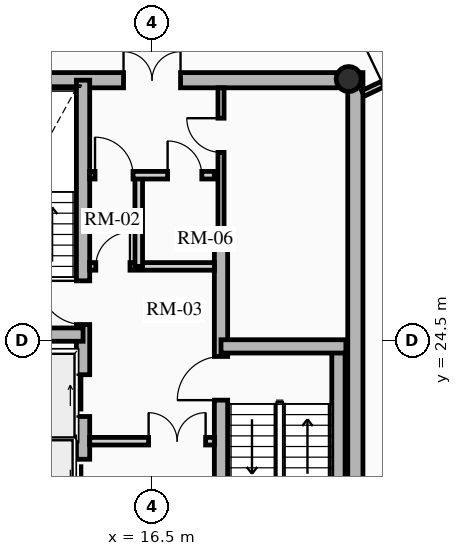
"""IFC4 building model, lengths in metres.
Left out: names, types, materials, properties, quantities, classifications, styles, units other than length and angle.
Written with IfcOpenShell. Run it as: python <this file> out.ifc"""

import sys

from ifc_helpers import new_model, si_unit, direction, frame, frame_2d, origin, origin_2d, place, context, subcontext, project, spatial, rectangle, hollow_circle, extrude, source, transform, mapped, element, fill, save


model = new_model("IFC4")
c1 = context("Model", 3, precision=1e-05, world=origin(), true_north=direction((0.0, 1.0)))
c2 = subcontext(c1, "Body", "Model", "MODEL_VIEW")
j1 = project(units=[si_unit("LENGTHUNIT", "METRE"), si_unit("PLANEANGLEUNIT", "RADIAN")], contexts=[c1])
p1 = place(None, origin())
s1 = spatial("IfcSite", under=j1, at=p1, CompositionType="ELEMENT")
p2 = place(p1, origin())
s2 = spatial("IfcBuilding", under=s1, at=p2, CompositionType="ELEMENT")
p3 = place(p2, frame((0.0, 0.0, 217.03)))
s3 = spatial("IfcBuildingStorey", under=s2, at=p3, CompositionType="ELEMENT", Elevation=217.03)
p4 = place(p3, frame((21.85, 17.45, 0.0), z_axis=(0.0, 0.0, 1.0), x_axis=(0.0, 1.0, 0.0)))
e1 = element("IfcWall", 1, at=p4, inside=s3, PredefinedType="SHEAR", context=c2, shape_type="SweptSolid", body=[
    extrude(rectangle(XDim=14.1, YDim=0.4, at=frame_2d((7.05, 0.0))), origin(), (0.0, 0.0, 1.0), 2.91),
])
p5 = place(p3, frame((11.15, 31.35, 0.0), z_axis=(0.0, 0.0, 1.0), x_axis=(1.0, 0.0, 0.0)))
e2 = element("IfcWall", 2, at=p5, inside=s3, PredefinedType="SHEAR", context=c2, shape_type="SweptSolid", body=[
    extrude(rectangle(XDim=10.7, YDim=0.4, at=frame_2d((5.35, 0.0))), origin(), (0.0, 0.0, 1.0), 2.91),
])
m1 = source(origin(), c2, "Body", "SweptSolid", [
    extrude(rectangle(XDim=1.5, YDim=2.02, at=frame_2d((0.75, 1.01))), frame((0.0, 0.21, 0.0), z_axis=(0.0, -1.0, 0.0), x_axis=(1.0, 0.0, 0.0)), (0.0, 0.0, 1.0), 0.42),
])
p6 = place(p5, frame((4.6, 0.0, 0.0)))
e3 = element("IfcOpeningElement", 3, at=p6, cuts=e2, PredefinedType="OPENING", context=c2, shape_type="MappedRepresentation", body=[
    mapped(m1, transform((0.0, 0.0, 0.0), x_axis=(1.0, 0.0, 0.0), y_axis=(0.0, 1.0, 0.0), z_axis=(0.0, 0.0, 1.0), scale=1.0)),
])
p7 = place(p3, frame((14.685, 17.65, 0.0), z_axis=(0.0, 0.0, 1.0), x_axis=(0.0, 1.0, 0.0)))
e4 = element("IfcWall", 4, at=p7, inside=s3, PredefinedType="SHEAR", context=c2, shape_type="SweptSolid", body=[
    extrude(rectangle(XDim=13.7, YDim=0.35, at=frame_2d((6.85, 0.0))), origin(), (0.0, 0.0, 1.0), 2.91),
])
m2 = source(origin(), c2, "Body", "SweptSolid", [
    extrude(rectangle(XDim=1.1, YDim=2.015, at=frame_2d((0.55, 1.007))), frame((0.0, 0.185, 0.0), z_axis=(0.0, -1.0, 0.0), x_axis=(1.0, 0.0, 0.0)), (0.0, 0.0, 1.0), 0.37),
])
p8 = place(p7, frame((4.85, 0.0, 0.0)))
e5 = element("IfcOpeningElement", 5, at=p8, cuts=e4, PredefinedType="OPENING", context=c2, shape_type="MappedRepresentation", body=[
    mapped(m2, transform((0.0, 0.0, 0.0), x_axis=(1.0, 0.0, 0.0), y_axis=(0.0, 1.0, 0.0), z_axis=(0.0, 0.0, 1.0), scale=1.0)),
])
p9 = place(p7, frame((0.625, 0.0, 0.0)))
e6 = element("IfcOpeningElement", 6, at=p9, cuts=e4, PredefinedType="OPENING", context=c2, shape_type="MappedRepresentation", body=[
    mapped(m2, transform((0.0, 0.0, 0.0), x_axis=(1.0, 0.0, 0.0), y_axis=(0.0, 1.0, 0.0), z_axis=(0.0, 0.0, 1.0), scale=1.0)),
])
p10 = place(p7, frame((2.625, 0.0, 0.0)))
e7 = element("IfcOpeningElement", 7, at=p10, cuts=e4, PredefinedType="OPENING", context=c2, shape_type="MappedRepresentation", body=[
    mapped(m2, transform((0.0, 0.0, 0.0), x_axis=(1.0, 0.0, 0.0), y_axis=(0.0, 1.0, 0.0), z_axis=(0.0, 0.0, 1.0), scale=1.0)),
])
m3 = source(origin(), c2, "Body", "SweptSolid", [
    extrude(rectangle(XDim=1.15, YDim=2.02, at=frame_2d((0.575, 1.01))), frame((0.0, 0.185, 0.0), z_axis=(0.0, -1.0, 0.0), x_axis=(1.0, 0.0, 0.0)), (0.0, 0.0, 1.0), 0.37),
])
p11 = place(p7, frame((7.27, 0.0, 0.0)))
e8 = element("IfcOpeningElement", 8, at=p11, cuts=e4, PredefinedType="OPENING", context=c2, shape_type="MappedRepresentation", body=[
    mapped(m3, transform((0.0, 0.0, 0.0), x_axis=(1.0, 0.0, 0.0), y_axis=(0.0, 1.0, 0.0), z_axis=(0.0, 0.0, 1.0), scale=1.0)),
])
p12 = place(p3, frame((18.315, 17.65, 0.0), z_axis=(0.0, 0.0, 1.0), x_axis=(0.0, 1.0, 0.0)))
e9 = element("IfcWall", 9, at=p12, inside=s3, PredefinedType="SHEAR", context=c2, shape_type="SweptSolid", body=[
    extrude(rectangle(XDim=9.6, YDim=0.35, at=frame_2d((4.8, 0.0))), origin(), (0.0, 0.0, 1.0), 2.91),
])
p13 = place(p12, frame((5.28, 0.0, 0.0)))
e10 = element("IfcOpeningElement", 10, at=p13, cuts=e9, PredefinedType="OPENING", context=c2, shape_type="MappedRepresentation", body=[
    mapped(m3, transform((0.0, 0.0, 0.0), x_axis=(1.0, 0.0, 0.0), y_axis=(0.0, 1.0, 0.0), z_axis=(0.0, 0.0, 1.0), scale=1.0)),
])
p14 = place(p3, frame((11.4, 24.655, 0.0), z_axis=(0.0, 0.0, 1.0), x_axis=(1.0, 0.0, 0.0)))
e11 = element("IfcWall", 11, at=p14, inside=s3, PredefinedType="SHEAR", context=c2, shape_type="SweptSolid", body=[
    extrude(rectangle(XDim=3.285, YDim=0.35, at=frame_2d((1.643, 0.0))), origin(), (0.0, 0.0, 1.0), 2.91),
])
p15 = place(p3, frame((21.405, 17.65, 0.0), z_axis=(0.0, 0.0, 1.0), x_axis=(0.0, 1.0, 0.0)))
e12 = element("IfcWall", 12, at=p15, inside=s3, PredefinedType="SHEAR", context=c2, shape_type="SweptSolid", body=[
    extrude(rectangle(XDim=6.695, YDim=0.35, at=frame_2d((3.348, 0.0))), origin(), (0.0, 0.0, 1.0), 2.91),
])
p16 = place(p3, frame((18.315, 24.345, 0.0), z_axis=(0.0, 0.0, 1.0), x_axis=(1.0, 0.0, 0.0)))
e13 = element("IfcWall", 13, at=p16, inside=s3, PredefinedType="SHEAR", context=c2, shape_type="SweptSolid", body=[
    extrude(rectangle(XDim=3.285, YDim=0.35, at=frame_2d((1.643, 0.0))), origin(), (0.0, 0.0, 1.0), 2.91),
])
p17 = place(p3, frame((21.675, 31.38, 0.0), z_axis=(0.0, 0.0, 1.0), x_axis=(1.0, 0.0, 0.0)))
e14 = element("IfcColumn", 14, at=p17, inside=s3, PredefinedType="COLUMN", context=c2, shape_type="SweptSolid", body=[
    extrude(hollow_circle(Radius=0.33, WallThickness=0.025, at=origin_2d()), origin(), (0.0, 0.0, 1.0), 2.91),
])
p18 = place(p3, frame((11.52, 21.8, 0.0), z_axis=(0.0, 0.0, 1.0), x_axis=(1.0, 0.0, 0.0)))
e15 = element("IfcWall", 15, at=p18, inside=s3, PredefinedType="SHEAR", context=c2, shape_type="SweptSolid", body=[
    extrude(rectangle(XDim=2.97, YDim=0.2, at=frame_2d((1.485, 0.0))), origin(), (0.0, 0.0, 1.0), 2.91),
])
p19 = place(p3, frame((14.86, 21.85, 0.0), z_axis=(0.0, 0.0, 1.0), x_axis=(1.0, 0.0, 0.0)))
e16 = element("IfcWall", 16, at=p19, inside=s3, PredefinedType="PARTITIONING", context=c2, shape_type="SweptSolid", body=[
    extrude(rectangle(XDim=3.28, YDim=0.2, at=frame_2d((1.64, 0.0))), origin(), (0.0, 0.0, 1.0), 2.685),
])
m4 = source(origin(), c2, "Body", "SweptSolid", [
    extrude(rectangle(XDim=1.5, YDim=2.02, at=frame_2d((0.75, 1.01))), frame((0.0, 0.11, 0.0), z_axis=(0.0, -1.0, 0.0), x_axis=(1.0, 0.0, 0.0)), (0.0, 0.0, 1.0), 0.22),
])
p20 = place(p19, frame((1.55, 0.0, 0.0)))
e17 = element("IfcOpeningElement", 17, at=p20, cuts=e16, PredefinedType="OPENING", context=c2, shape_type="MappedRepresentation", body=[
    mapped(m4, transform((0.0, 0.0, 0.0), x_axis=(1.0, 0.0, 0.0), y_axis=(0.0, 1.0, 0.0), z_axis=(0.0, 0.0, 1.0), scale=1.0)),
])
p21 = place(p3, frame((14.86, 26.45, 0.0), z_axis=(0.0, 0.0, 1.0), x_axis=(1.0, 0.0, 0.0)))
e18 = element("IfcWall", 18, at=p21, inside=s3, PredefinedType="PARTITIONING", context=c2, shape_type="SweptSolid", body=[
    extrude(rectangle(XDim=3.28, YDim=0.2, at=frame_2d((1.64, 0.0))), origin(), (0.0, 0.0, 1.0), 2.685),
])
m5 = source(origin(), c2, "Body", "SweptSolid", [
    extrude(rectangle(XDim=0.9, YDim=2.005, at=frame_2d((0.45, 1.002))), frame((0.0, 0.11, 0.0), z_axis=(0.0, -1.0, 0.0), x_axis=(1.0, 0.0, 0.0)), (0.0, 0.0, 1.0), 0.22),
])
p22 = place(p21, frame((0.16, 0.0, 0.0)))
e19 = element("IfcOpeningElement", 19, at=p22, cuts=e18, PredefinedType="OPENING", context=c2, shape_type="MappedRepresentation", body=[
    mapped(m5, transform((0.0, 0.0, 0.0), x_axis=(1.0, 0.0, 0.0), y_axis=(0.0, 1.0, 0.0), z_axis=(0.0, 0.0, 1.0), scale=1.0)),
])
p23 = place(p3, frame((16.15, 26.45, 0.0), z_axis=(0.0, 0.0, 1.0), x_axis=(0.0, 1.0, 0.0)))
e20 = element("IfcWall", 20, at=p23, inside=s3, PredefinedType="PARTITIONING", context=c2, shape_type="SweptSolid", body=[
    extrude(rectangle(XDim=2.4, YDim=0.2, at=frame_2d((1.2, 0.0))), origin(), (0.0, 0.0, 1.0), 2.685),
])
p24 = place(p3, frame((14.86, 28.85, 0.0), z_axis=(0.0, 0.0, 1.0), x_axis=(1.0, 0.0, 0.0)))
e21 = element("IfcWall", 21, at=p24, inside=s3, PredefinedType="PARTITIONING", context=c2, shape_type="SweptSolid", body=[
    extrude(rectangle(XDim=3.28, YDim=0.2, at=frame_2d((1.64, 0.0))), origin(), (0.0, 0.0, 1.0), 2.685),
])
m6 = source(origin(), c2, "Body", "SweptSolid", [
    extrude(rectangle(XDim=1.0, YDim=2.015, at=frame_2d((0.5, 1.007))), frame((0.0, 0.11, 0.0), z_axis=(0.0, -1.0, 0.0), x_axis=(1.0, 0.0, 0.0)), (0.0, 0.0, 1.0), 0.22),
])
p25 = place(p24, frame((0.14, 0.0, 0.0)))
e22 = element("IfcOpeningElement", 22, at=p25, cuts=e21, PredefinedType="OPENING", context=c2, shape_type="MappedRepresentation", body=[
    mapped(m6, transform((0.0, 0.0, 0.0), x_axis=(1.0, 0.0, 0.0), y_axis=(0.0, 1.0, 0.0), z_axis=(0.0, 0.0, 1.0), scale=1.0)),
])
p26 = place(p24, frame((2.05, 0.0, 0.0)))
e23 = element("IfcOpeningElement", 23, at=p26, cuts=e21, PredefinedType="OPENING", context=c2, shape_type="MappedRepresentation", body=[
    mapped(m5, transform((0.0, 0.0, 0.0), x_axis=(1.0, 0.0, 0.0), y_axis=(0.0, 1.0, 0.0), z_axis=(0.0, 0.0, 1.0), scale=1.0)),
])
p27 = place(p3, frame((18.315, 27.25, 0.0), z_axis=(0.0, 0.0, 1.0), x_axis=(0.0, 1.0, 0.0)))
e24 = element("IfcWall", 24, at=p27, inside=s3, PredefinedType="PARTITIONING", context=c2, shape_type="SweptSolid", body=[
    extrude(rectangle(XDim=3.9, YDim=0.16, at=frame_2d((1.95, 0.0))), origin(), (0.0, 0.0, 1.0), 2.685),
])
m7 = source(origin(), c2, "Body", "SweptSolid", [
    extrude(rectangle(XDim=0.9, YDim=2.005, at=frame_2d((0.45, 1.002))), frame((0.0, 0.09, 0.0), z_axis=(0.0, -1.0, 0.0), x_axis=(1.0, 0.0, 0.0)), (0.0, 0.0, 1.0), 0.18),
])
p28 = place(p27, frame((2.2, 0.0, 0.0)))
e25 = element("IfcOpeningElement", 25, at=p28, cuts=e24, PredefinedType="OPENING", context=c2, shape_type="MappedRepresentation", body=[
    mapped(m7, transform((0.0, 0.0, 0.0), x_axis=(1.0, 0.0, 0.0), y_axis=(0.0, 1.0, 0.0), z_axis=(0.0, 0.0, 1.0), scale=1.0)),
])
p29 = place(p3, frame((22.05, 31.0, 0.0), z_axis=(0.0, 0.0, 1.0), x_axis=(0.903013459407, 0.429612257891, 0.0)))
e26 = element("IfcWall", 26, at=p29, inside=s3, PredefinedType="PARTITIONING", context=c2, shape_type="SweptSolid", body=[
    extrude(rectangle(XDim=1.829, YDim=0.16, at=frame_2d((0.914, 0.0))), origin(), (0.0, 0.0, 1.0), 2.255),
])
m8 = source(origin(), c2, "Body", "SweptSolid", [
    extrude(rectangle(XDim=1.05, YDim=2.015, at=frame_2d((0.525, 1.007))), frame((0.0, 0.09, 0.0), z_axis=(0.0, -1.0, 0.0), x_axis=(1.0, 0.0, 0.0)), (0.0, 0.0, 1.0), 0.18),
])
p30 = place(p29, frame((0.579, 0.0, 0.0)))
e27 = element("IfcOpeningElement", 27, at=p30, cuts=e26, PredefinedType="OPENING", context=c2, shape_type="MappedRepresentation", body=[
    mapped(m8, transform((0.0, 0.0, 0.0), x_axis=(1.0, 0.0, 0.0), y_axis=(0.0, 1.0, 0.0), z_axis=(0.0, 0.0, 1.0), scale=1.0)),
])
m9 = source(origin(), c2, "Body", "SweptSolid", [
    extrude(rectangle(XDim=1.1, YDim=2.015, at=frame_2d((0.55, 1.007))), frame((0.0, 0.025, 0.0), z_axis=(0.0, -1.0, 0.0), x_axis=(1.0, 0.0, 0.0)), (0.0, 0.0, 1.0), 0.05),
])
p31 = place(p8, origin())
e28 = element("IfcDoor", 28, at=p31, inside=s3, OperationType="SLIDING_TO_RIGHT", PredefinedType="DOOR", context=c2, shape_type="MappedRepresentation", body=[
    mapped(m9, transform((0.0, 0.0, 0.0), x_axis=(1.0, 0.0, 0.0), y_axis=(0.0, 1.0, 0.0), z_axis=(0.0, 0.0, 1.0), scale=1.0)),
])
fill(e5, e28)
p32 = place(p10, origin())
e29 = element("IfcDoor", 29, at=p32, inside=s3, OperationType="SLIDING_TO_LEFT", PredefinedType="DOOR", context=c2, shape_type="MappedRepresentation", body=[
    mapped(m9, transform((0.0, 0.0, 0.0), x_axis=(1.0, 0.0, 0.0), y_axis=(0.0, 1.0, 0.0), z_axis=(0.0, 0.0, 1.0), scale=1.0)),
])
fill(e7, e29)
m10 = source(origin(), c2, "Body", "SweptSolid", [
    extrude(rectangle(XDim=1.15, YDim=2.02, at=frame_2d((0.575, 1.01))), frame((0.0, 0.025, 0.0), z_axis=(0.0, -1.0, 0.0), x_axis=(1.0, 0.0, 0.0)), (0.0, 0.0, 1.0), 0.05),
])
p33 = place(p11, origin())
e30 = element("IfcDoor", 30, at=p33, inside=s3, OperationType="SINGLE_SWING_RIGHT", PredefinedType="DOOR", context=c2, shape_type="MappedRepresentation", body=[
    mapped(m10, transform((0.0, 0.0, 0.0), x_axis=(1.0, 0.0, 0.0), y_axis=(0.0, 1.0, 0.0), z_axis=(0.0, 0.0, 1.0), scale=1.0)),
])
fill(e8, e30)
p34 = place(p13, origin())
e31 = element("IfcDoor", 31, at=p34, inside=s3, OperationType="SINGLE_SWING_LEFT", PredefinedType="DOOR", context=c2, shape_type="MappedRepresentation", body=[
    mapped(m10, transform((0.0, 0.0, 0.0), x_axis=(1.0, 0.0, 0.0), y_axis=(0.0, 1.0, 0.0), z_axis=(0.0, 0.0, 1.0), scale=1.0)),
])
fill(e10, e31)
m11 = source(origin(), c2, "Body", "SweptSolid", [
    extrude(rectangle(XDim=1.5, YDim=2.02, at=frame_2d((0.75, 1.01))), frame((0.0, 0.025, 0.0), z_axis=(0.0, -1.0, 0.0), x_axis=(1.0, 0.0, 0.0)), (0.0, 0.0, 1.0), 0.05),
])
p35 = place(p6, origin())
e32 = element("IfcDoor", 32, at=p35, inside=s3, OperationType="DOUBLE_DOOR_SINGLE_SWING", PredefinedType="DOOR", context=c2, shape_type="MappedRepresentation", body=[
    mapped(m11, transform((0.0, 0.0, 0.0), x_axis=(1.0, 0.0, 0.0), y_axis=(0.0, 1.0, 0.0), z_axis=(0.0, 0.0, 1.0), scale=1.0)),
])
fill(e3, e32)
p36 = place(p20, origin())
e33 = element("IfcDoor", 33, at=p36, inside=s3, OperationType="DOUBLE_DOOR_SINGLE_SWING", PredefinedType="DOOR", context=c2, shape_type="MappedRepresentation", body=[
    mapped(m11, transform((0.0, 0.0, 0.0), x_axis=(1.0, 0.0, 0.0), y_axis=(0.0, 1.0, 0.0), z_axis=(0.0, 0.0, 1.0), scale=1.0)),
])
fill(e17, e33)
m12 = source(origin(), c2, "Body", "SweptSolid", [
    extrude(rectangle(XDim=0.9, YDim=2.005, at=frame_2d((0.45, 1.002))), frame((0.0, 0.025, 0.0), z_axis=(0.0, -1.0, 0.0), x_axis=(1.0, 0.0, 0.0)), (0.0, 0.0, 1.0), 0.05),
])
p37 = place(p22, origin())
e34 = element("IfcDoor", 34, at=p37, inside=s3, OperationType="SINGLE_SWING_RIGHT", PredefinedType="DOOR", context=c2, shape_type="MappedRepresentation", body=[
    mapped(m12, transform((0.0, 0.0, 0.0), x_axis=(1.0, 0.0, 0.0), y_axis=(0.0, 1.0, 0.0), z_axis=(0.0, 0.0, 1.0), scale=1.0)),
])
fill(e19, e34)
m13 = source(origin(), c2, "Body", "SweptSolid", [
    extrude(rectangle(XDim=1.0, YDim=2.015, at=frame_2d((0.5, 1.007))), frame((0.0, 0.025, 0.0), z_axis=(0.0, -1.0, 0.0), x_axis=(1.0, 0.0, 0.0)), (0.0, 0.0, 1.0), 0.05),
])
p38 = place(p25, origin())
e35 = element("IfcDoor", 35, at=p38, inside=s3, OperationType="SINGLE_SWING_LEFT", PredefinedType="DOOR", context=c2, shape_type="MappedRepresentation", body=[
    mapped(m13, transform((0.0, 0.0, 0.0), x_axis=(1.0, 0.0, 0.0), y_axis=(0.0, 1.0, 0.0), z_axis=(0.0, 0.0, 1.0), scale=1.0)),
])
fill(e22, e35)
p39 = place(p26, origin())
e36 = element("IfcDoor", 36, at=p39, inside=s3, OperationType="SINGLE_SWING_LEFT", PredefinedType="DOOR", context=c2, shape_type="MappedRepresentation", body=[
    mapped(m12, transform((0.0, 0.0, 0.0), x_axis=(1.0, 0.0, 0.0), y_axis=(0.0, 1.0, 0.0), z_axis=(0.0, 0.0, 1.0), scale=1.0)),
])
fill(e23, e36)
p40 = place(p28, origin())
e37 = element("IfcDoor", 37, at=p40, inside=s3, OperationType="SINGLE_SWING_RIGHT", PredefinedType="DOOR", context=c2, shape_type="MappedRepresentation", body=[
    mapped(m12, transform((0.0, 0.0, 0.0), x_axis=(1.0, 0.0, 0.0), y_axis=(0.0, 1.0, 0.0), z_axis=(0.0, 0.0, 1.0), scale=1.0)),
])
fill(e25, e37)
save(model, sys.argv[1])
